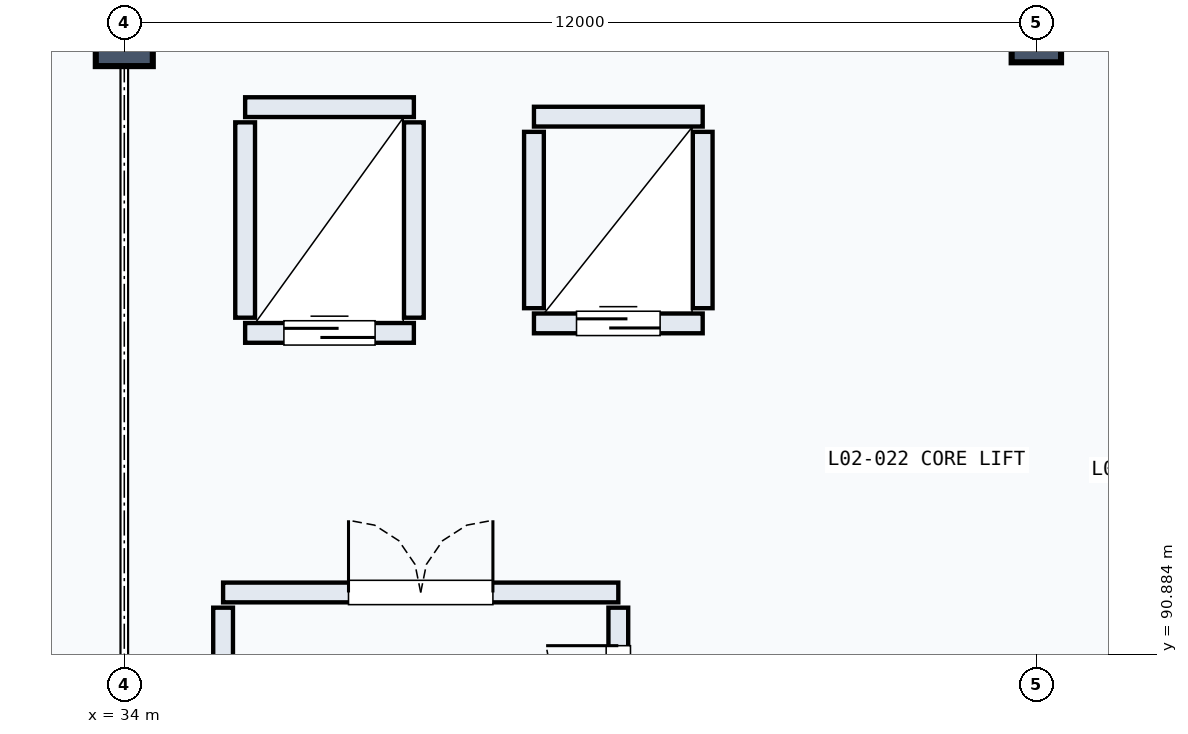
"""IFC4 building model, lengths in metres.
Left out: names, types, materials, properties, quantities, classifications, styles, units other than length and angle.
Written with IfcOpenShell. Run it as: python <this file> out.ifc"""

import sys

from ifc_helpers import new_model, si_unit, direction, frame, frame_2d, origin, origin_2d, place, context, subcontext, project, spatial, rectangle, circle, extrude, element, fill, save


model = new_model("IFC4")
c1 = context("Model", 3, precision=1e-05, world=origin(), true_north=direction((0.0, 1.0)))
c2 = subcontext(c1, "Body", "Model", "MODEL_VIEW")
j1 = project(units=[si_unit("LENGTHUNIT", "METRE"), si_unit("PLANEANGLEUNIT", "RADIAN")], contexts=[c1])
p1 = place(None, origin())
s1 = spatial("IfcSite", under=j1, at=p1, CompositionType="ELEMENT")
p2 = place(p1, origin())
s2 = spatial("IfcBuilding", under=s1, at=p2, CompositionType="ELEMENT")
p3 = place(p2, frame((0.0, 0.0, 10.2)))
s3 = spatial("IfcBuildingStorey", under=s2, at=p3, CompositionType="ELEMENT", Elevation=10.2)
p4 = place(p3, frame((34.0, 99.0, 0.0), z_axis=(0.0, 0.0, 1.0), x_axis=(1.0, 0.0, 0.0)))
e1 = element("IfcColumn", 1, at=p4, inside=s3, PredefinedType="COLUMN", context=c2, shape_type="SweptSolid", body=[
    extrude(circle(Radius=0.375, at=origin_2d()), origin(), (0.0, 0.0, 1.0), 4.5),
])
p5 = place(p3, frame((46.0, 99.0, 0.0), z_axis=(0.0, 0.0, 1.0), x_axis=(1.0, 0.0, 0.0)))
e2 = element("IfcColumn", 2, at=p5, inside=s3, PredefinedType="COLUMN", context=c2, shape_type="SweptSolid", body=[
    extrude(circle(Radius=0.325, at=origin_2d()), origin(), (0.0, 0.0, 1.0), 4.5),
])
p6 = place(p3, frame((35.59, 95.115, 0.0), z_axis=(0.0, 0.0, 1.0), x_axis=(1.0, 0.0, 0.0)))
e3 = element("IfcWall", 3, at=p6, inside=s3, PredefinedType="SOLIDWALL", context=c2, shape_type="SweptSolid", body=[
    extrude(rectangle(XDim=2.22, YDim=0.26, at=frame_2d((1.11, 0.0))), origin(), (0.0, 0.0, 1.0), 4.14),
])
p7 = place(p6, frame((0.51, 0.0, 0.0)))
e4 = element("IfcOpeningElement", 4, at=p7, cuts=e3, PredefinedType="OPENING", context=c2, shape_type="SweptSolid", body=[
    extrude(rectangle(XDim=1.2, YDim=2.2, at=frame_2d((0.6, 1.1))), frame((0.0, 0.14, 0.0), z_axis=(0.0, -1.0, 0.0), x_axis=(1.0, 0.0, 0.0)), (0.0, 0.0, 1.0), 0.28),
])
p8 = place(p3, frame((35.59, 98.085, 0.0), z_axis=(0.0, 0.0, 1.0), x_axis=(1.0, 0.0, 0.0)))
e5 = element("IfcWall", 5, at=p8, inside=s3, PredefinedType="SOLIDWALL", context=c2, shape_type="SweptSolid", body=[
    extrude(rectangle(XDim=2.22, YDim=0.26, at=frame_2d((1.11, 0.0))), origin(), (0.0, 0.0, 1.0), 4.14),
])
for number, where, z_axis, x_axis in (
    (6, (35.59, 95.315, 0.0), (0.0, 0.0, 1.0), (0.0, 1.0, 0.0)),
    (7, (37.81, 95.315, 0.0), (0.0, 0.0, 1.0), (0.0, 1.0, 0.0)),
):
    element("IfcWall", number, at=place(p3, frame(where, z_axis=z_axis, x_axis=x_axis)), inside=s3, PredefinedType="SOLIDWALL", context=c2, shape_type="SweptSolid", body=[
        extrude(rectangle(XDim=2.57, YDim=0.26, at=frame_2d((1.285, 0.0))), origin(), (0.0, 0.0, 1.0), 4.14),
    ])
p9 = place(p3, frame((39.39, 95.24, 0.0), z_axis=(0.0, 0.0, 1.0), x_axis=(1.0, 0.0, 0.0)))
e8 = element("IfcWall", 8, at=p9, inside=s3, PredefinedType="SOLIDWALL", context=c2, shape_type="SweptSolid", body=[
    extrude(rectangle(XDim=2.22, YDim=0.26, at=frame_2d((1.11, 0.0))), origin(), (0.0, 0.0, 1.0), 4.14),
])
p10 = place(p9, frame((0.56, 0.0, 0.0)))
e9 = element("IfcOpeningElement", 9, at=p10, cuts=e8, PredefinedType="OPENING", context=c2, shape_type="SweptSolid", body=[
    extrude(rectangle(XDim=1.1, YDim=2.15, at=frame_2d((0.55, 1.075))), frame((0.0, 0.14, 0.0), z_axis=(0.0, -1.0, 0.0), x_axis=(1.0, 0.0, 0.0)), (0.0, 0.0, 1.0), 0.28),
])
p11 = place(p3, frame((39.39, 97.96, 0.0), z_axis=(0.0, 0.0, 1.0), x_axis=(1.0, 0.0, 0.0)))
e10 = element("IfcWall", 10, at=p11, inside=s3, PredefinedType="SOLIDWALL", context=c2, shape_type="SweptSolid", body=[
    extrude(rectangle(XDim=2.22, YDim=0.26, at=frame_2d((1.11, 0.0))), origin(), (0.0, 0.0, 1.0), 4.14),
])
for number, where, z_axis, x_axis in (
    (11, (39.39, 95.44, 0.0), (0.0, 0.0, 1.0), (0.0, 1.0, 0.0)),
    (12, (41.61, 95.44, 0.0), (0.0, 0.0, 1.0), (0.0, 1.0, 0.0)),
):
    element("IfcWall", number, at=place(p3, frame(where, z_axis=z_axis, x_axis=x_axis)), inside=s3, PredefinedType="SOLIDWALL", context=c2, shape_type="SweptSolid", body=[
        extrude(rectangle(XDim=2.32, YDim=0.26, at=frame_2d((1.16, 0.0))), origin(), (0.0, 0.0, 1.0), 4.14),
    ])
p12 = place(p3, frame((35.3, 91.7, 0.0), z_axis=(0.0, 0.0, 1.0), x_axis=(1.0, 0.0, 0.0)))
e13 = element("IfcWall", 13, at=p12, inside=s3, PredefinedType="SOLIDWALL", context=c2, shape_type="SweptSolid", body=[
    extrude(rectangle(XDim=5.2, YDim=0.26, at=frame_2d((2.6, 0.0))), origin(), (0.0, 0.0, 1.0), 4.14),
])
p13 = place(p12, frame((1.65, 0.0, 0.0)))
e14 = element("IfcOpeningElement", 14, at=p13, cuts=e13, PredefinedType="OPENING", context=c2, shape_type="SweptSolid", body=[
    extrude(rectangle(XDim=1.9, YDim=2.2, at=frame_2d((0.95, 1.1))), frame((0.0, 0.14, 0.0), z_axis=(0.0, -1.0, 0.0), x_axis=(1.0, 0.0, 0.0)), (0.0, 0.0, 1.0), 0.28),
])
p14 = place(p3, frame((35.3, 88.6, 0.0), z_axis=(0.0, 0.0, 1.0), x_axis=(0.0, 1.0, 0.0)))
e15 = element("IfcWall", 15, at=p14, inside=s3, PredefinedType="SOLIDWALL", context=c2, shape_type="SweptSolid", body=[
    extrude(rectangle(XDim=2.9, YDim=0.26, at=frame_2d((1.45, 0.0))), origin(), (0.0, 0.0, 1.0), 4.14),
])
p15 = place(p3, frame((40.5, 88.6, 0.0), z_axis=(0.0, 0.0, 1.0), x_axis=(0.0, 1.0, 0.0)))
e16 = element("IfcWall", 16, at=p15, inside=s3, PredefinedType="SOLIDWALL", context=c2, shape_type="SweptSolid", body=[
    extrude(rectangle(XDim=2.9, YDim=0.26, at=frame_2d((1.45, 0.0))), origin(), (0.0, 0.0, 1.0), 4.14),
])
p16 = place(p15, frame((0.5, 0.0, 0.0)))
e17 = element("IfcOpeningElement", 17, at=p16, cuts=e16, PredefinedType="OPENING", context=c2, shape_type="SweptSolid", body=[
    extrude(rectangle(XDim=1.9, YDim=2.2, at=frame_2d((0.95, 1.1))), frame((0.0, 0.14, 0.0), z_axis=(0.0, -1.0, 0.0), x_axis=(1.0, 0.0, 0.0)), (0.0, 0.0, 1.0), 0.28),
])
p17 = place(p7, origin())
e18 = element("IfcDoor", 18, at=p17, inside=s3, OperationType="SLIDING_TO_LEFT", PredefinedType="DOOR", context=c2, shape_type="SweptSolid", body=[
    extrude(rectangle(XDim=1.2, YDim=2.2, at=frame_2d((0.6, 1.1))), frame((0.0, 0.025, 0.0), z_axis=(0.0, -1.0, 0.0), x_axis=(1.0, 0.0, 0.0)), (0.0, 0.0, 1.0), 0.05),
])
fill(e4, e18)
p18 = place(p10, origin())
e19 = element("IfcDoor", 19, at=p18, inside=s3, OperationType="SLIDING_TO_LEFT", PredefinedType="DOOR", context=c2, shape_type="SweptSolid", body=[
    extrude(rectangle(XDim=1.1, YDim=2.15, at=frame_2d((0.55, 1.075))), frame((0.0, 0.025, 0.0), z_axis=(0.0, -1.0, 0.0), x_axis=(1.0, 0.0, 0.0)), (0.0, 0.0, 1.0), 0.05),
])
fill(e9, e19)
p19 = place(p13, origin())
e20 = element("IfcDoor", 20, at=p19, inside=s3, OperationType="DOUBLE_DOOR_SINGLE_SWING", PredefinedType="DOOR", context=c2, shape_type="SweptSolid", body=[
    extrude(rectangle(XDim=1.9, YDim=2.2, at=frame_2d((0.95, 1.1))), frame((0.0, 0.025, 0.0), z_axis=(0.0, -1.0, 0.0), x_axis=(1.0, 0.0, 0.0)), (0.0, 0.0, 1.0), 0.05),
])
fill(e14, e20)
p20 = place(p16, origin())
e21 = element("IfcDoor", 21, at=p20, inside=s3, OperationType="DOUBLE_DOOR_SINGLE_SWING", PredefinedType="DOOR", context=c2, shape_type="SweptSolid", body=[
    extrude(rectangle(XDim=1.9, YDim=2.2, at=frame_2d((0.95, 1.1))), frame((0.0, 0.025, 0.0), z_axis=(0.0, -1.0, 0.0), x_axis=(1.0, 0.0, 0.0)), (0.0, 0.0, 1.0), 0.05),
])
fill(e17, e21)
save(model, sys.argv[1])
